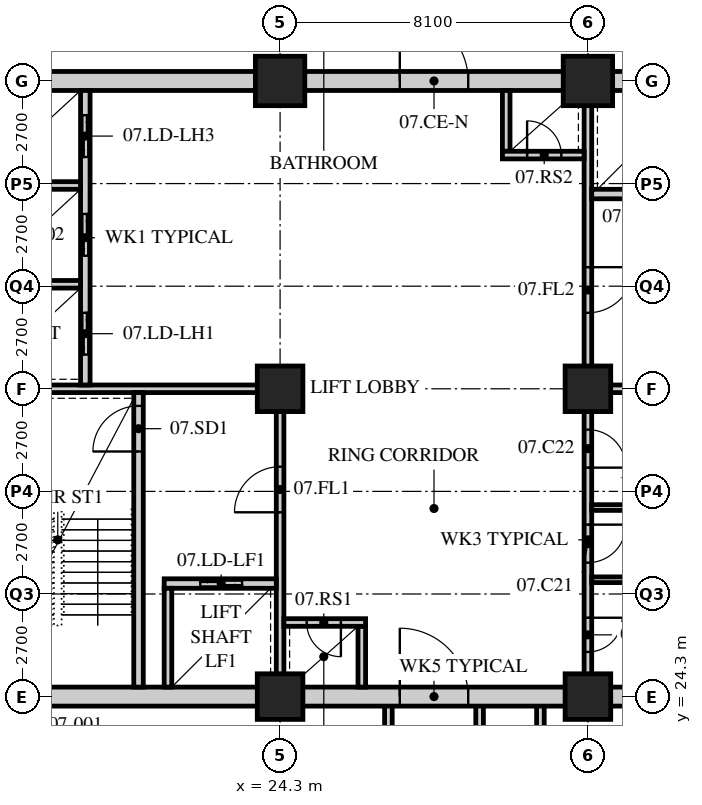
"""IFC4 building model, lengths in metres.
Left out: names, types, materials, properties, quantities, classifications, styles, units other than length and angle.
Written with IfcOpenShell. Run it as: python <this file> out.ifc"""

import sys

from ifc_helpers import new_model, si_unit, direction, frame, frame_2d, origin, origin_2d, place, context, subcontext, project, spatial, rectangle, hollow_rectangle, extrude, element, fill, save


model = new_model("IFC4")
c1 = context("Model", 3, precision=1e-05, world=origin(), true_north=direction((0.0, 1.0)))
c2 = subcontext(c1, "Body", "Model", "MODEL_VIEW")
j1 = project(units=[si_unit("LENGTHUNIT", "METRE"), si_unit("PLANEANGLEUNIT", "RADIAN")], contexts=[c1])
p1 = place(None, origin())
s1 = spatial("IfcSite", under=j1, at=p1, CompositionType="ELEMENT")
p2 = place(p1, origin())
s2 = spatial("IfcBuilding", under=s1, at=p2, CompositionType="ELEMENT")
p3 = place(p2, frame((0.0, 0.0, 36.4)))
s3 = spatial("IfcBuildingStorey", under=s2, at=p3, CompositionType="ELEMENT", Elevation=36.4)
for number, where, z_axis, x_axis in (
    (1, (24.3, 24.3, 0.0), (0.0, 0.0, 1.0), (1.0, 0.0, 0.0)),
    (2, (24.3, 32.4, 0.0), (0.0, 0.0, 1.0), (1.0, 0.0, 0.0)),
):
    element("IfcColumn", number, at=place(p3, frame(where, z_axis=z_axis, x_axis=x_axis)), inside=s3, PredefinedType="COLUMN", context=c2, shape_type="SweptSolid", body=[
        extrude(hollow_rectangle(XDim=1.2, YDim=1.2, WallThickness=0.12, at=origin_2d()), origin(), (0.0, 0.0, 1.0), 3.4),
    ])
p4 = place(p3, frame((24.3, 40.5, 0.0), z_axis=(0.0, 0.0, 1.0), x_axis=(1.0, 0.0, 0.0)))
e3 = element("IfcColumn", 3, at=p4, inside=s3, PredefinedType="COLUMN", context=c2, shape_type="SweptSolid", body=[
    extrude(hollow_rectangle(XDim=1.3, YDim=1.3, WallThickness=0.13, at=origin_2d()), origin(), (0.0, 0.0, 1.0), 3.4),
])
for number, where, z_axis, x_axis in (
    (4, (32.4, 24.3, 0.0), (0.0, 0.0, 1.0), (1.0, 0.0, 0.0)),
    (5, (32.4, 32.4, 0.0), (0.0, 0.0, 1.0), (1.0, 0.0, 0.0)),
):
    element("IfcColumn", number, at=place(p3, frame(where, z_axis=z_axis, x_axis=x_axis)), inside=s3, PredefinedType="COLUMN", context=c2, shape_type="SweptSolid", body=[
        extrude(hollow_rectangle(XDim=1.2, YDim=1.2, WallThickness=0.12, at=origin_2d()), origin(), (0.0, 0.0, 1.0), 3.4),
    ])
p5 = place(p3, frame((32.4, 40.5, 0.0), z_axis=(0.0, 0.0, 1.0), x_axis=(1.0, 0.0, 0.0)))
e6 = element("IfcColumn", 6, at=p5, inside=s3, PredefinedType="COLUMN", context=c2, shape_type="SweptSolid", body=[
    extrude(hollow_rectangle(XDim=1.3, YDim=1.3, WallThickness=0.13, at=origin_2d()), origin(), (0.0, 0.0, 1.0), 3.4),
])
for number, where, z_axis, x_axis in (
    (7, (31.15, 18.0, 0.0), (0.0, 0.0, 1.0), (0.0, 1.0, 0.0)),
    (8, (27.15, 18.0, 0.0), (0.0, 0.0, 1.0), (0.0, 1.0, 0.0)),
    (9, (29.55, 18.0, 0.0), (0.0, 0.0, 1.0), (0.0, 1.0, 0.0)),
):
    element("IfcWall", number, at=place(p3, frame(where, z_axis=z_axis, x_axis=x_axis)), inside=s3, PredefinedType="SOLIDWALL", context=c2, shape_type="SweptSolid", body=[
        extrude(rectangle(XDim=6.3, YDim=0.2, at=frame_2d((3.15, 0.0))), origin(), (0.0, 0.0, 1.0), 3.19),
    ])
p6 = place(p3, frame((15.95, 24.3, 0.0), z_axis=(0.0, 0.0, 1.0), x_axis=(1.0, 0.0, 0.0)))
e10 = element("IfcWall", 10, at=p6, inside=s3, PredefinedType="SOLIDWALL", context=c2, shape_type="SweptSolid", body=[
    extrude(rectangle(XDim=24.8, YDim=0.5, at=frame_2d((12.4, 0.0))), origin(), (0.0, 0.0, 1.0), 2.54),
])
p7 = place(p6, frame((11.5, 0.0, 0.0)))
e11 = element("IfcOpeningElement", 11, at=p7, cuts=e10, PredefinedType="OPENING", context=c2, shape_type="SweptSolid", body=[
    extrude(rectangle(XDim=1.8, YDim=2.4, at=frame_2d((0.9, 1.2))), frame((0.0, 0.26, 0.0), z_axis=(0.0, -1.0, 0.0), x_axis=(1.0, 0.0, 0.0)), (0.0, 0.0, 1.0), 0.52),
])
p8 = place(p3, frame((15.95, 40.5, 0.0), z_axis=(0.0, 0.0, 1.0), x_axis=(1.0, 0.0, 0.0)))
e12 = element("IfcWall", 12, at=p8, inside=s3, PredefinedType="SOLIDWALL", context=c2, shape_type="SweptSolid", body=[
    extrude(rectangle(XDim=24.8, YDim=0.5, at=frame_2d((12.4, 0.0))), origin(), (0.0, 0.0, 1.0), 2.54),
])
p9 = place(p8, frame((11.5, 0.0, 0.0)))
e13 = element("IfcOpeningElement", 13, at=p9, cuts=e12, PredefinedType="OPENING", context=c2, shape_type="SweptSolid", body=[
    extrude(rectangle(XDim=1.8, YDim=2.4, at=frame_2d((0.9, 1.2))), frame((0.0, 0.26, 0.0), z_axis=(0.0, -1.0, 0.0), x_axis=(1.0, 0.0, 0.0)), (0.0, 0.0, 1.0), 0.52),
])
p10 = place(p3, frame((16.45, 32.4, 0.0), z_axis=(0.0, 0.0, 1.0), x_axis=(1.0, 0.0, 0.0)))
e14 = element("IfcWall", 14, at=p10, inside=s3, PredefinedType="SOLIDWALL", context=c2, shape_type="SweptSolid", body=[
    extrude(rectangle(XDim=7.95, YDim=0.2, at=frame_2d((3.975, 0.0))), origin(), (0.0, 0.0, 1.0), 2.578),
])
p11 = place(p3, frame((24.3, 24.55, 0.0), z_axis=(0.0, 0.0, 1.0), x_axis=(0.0, 1.0, 0.0)))
e15 = element("IfcWall", 15, at=p11, inside=s3, PredefinedType="SOLIDWALL", context=c2, shape_type="SweptSolid", body=[
    extrude(rectangle(XDim=7.75, YDim=0.2, at=frame_2d((3.875, 0.0))), origin(), (0.0, 0.0, 1.0), 2.578),
])
p12 = place(p11, frame((4.6, 0.0, 0.0)))
e16 = element("IfcOpeningElement", 16, at=p12, cuts=e15, PredefinedType="OPENING", context=c2, shape_type="SweptSolid", body=[
    extrude(rectangle(XDim=1.2, YDim=2.1, at=frame_2d((0.6, 1.05))), frame((0.0, 0.11, 0.0), z_axis=(0.0, -1.0, 0.0), x_axis=(1.0, 0.0, 0.0)), (0.0, 0.0, 1.0), 0.22),
])
p13 = place(p3, frame((20.575, 24.55, 0.0), z_axis=(0.0, 0.0, 1.0), x_axis=(0.0, 1.0, 0.0)))
e17 = element("IfcWall", 17, at=p13, inside=s3, PredefinedType="SOLIDWALL", context=c2, shape_type="SweptSolid", body=[
    extrude(rectangle(XDim=7.75, YDim=0.25, at=frame_2d((3.875, 0.0))), origin(), (0.0, 0.0, 1.0), 3.19),
])
p14 = place(p13, frame((6.2, 0.0, 0.0)))
e18 = element("IfcOpeningElement", 18, at=p14, cuts=e17, PredefinedType="OPENING", context=c2, shape_type="SweptSolid", body=[
    extrude(rectangle(XDim=1.2, YDim=2.1, at=frame_2d((0.6, 1.05))), frame((0.0, 0.135, 0.0), z_axis=(0.0, -1.0, 0.0), x_axis=(1.0, 0.0, 0.0)), (0.0, 0.0, 1.0), 0.27),
])
p15 = place(p3, frame((21.25, 27.275, 0.0), z_axis=(0.0, 0.0, 1.0), x_axis=(1.0, 0.0, 0.0)))
e19 = element("IfcWall", 19, at=p15, inside=s3, PredefinedType="SOLIDWALL", context=c2, shape_type="SweptSolid", body=[
    extrude(rectangle(XDim=2.95, YDim=0.25, at=frame_2d((1.475, 0.0))), origin(), (0.0, 0.0, 1.0), 3.19),
])
p16 = place(p15, frame((0.95, 0.0, 0.0)))
e20 = element("IfcOpeningElement", 20, at=p16, cuts=e19, PredefinedType="OPENING", context=c2, shape_type="SweptSolid", body=[
    extrude(rectangle(XDim=1.1, YDim=2.4, at=frame_2d((0.55, 1.2))), frame((0.0, 0.135, 0.0), z_axis=(0.0, -1.0, 0.0), x_axis=(1.0, 0.0, 0.0)), (0.0, 0.0, 1.0), 0.27),
])
p17 = place(p3, frame((21.35, 24.55, 0.0), z_axis=(0.0, 0.0, 1.0), x_axis=(0.0, 1.0, 0.0)))
e21 = element("IfcWall", 21, at=p17, inside=s3, PredefinedType="SOLIDWALL", context=c2, shape_type="SweptSolid", body=[
    extrude(rectangle(XDim=2.6, YDim=0.2, at=frame_2d((1.3, 0.0))), origin(), (0.0, 0.0, 1.0), 3.19),
])
p18 = place(p3, frame((19.175, 32.5, 0.0), z_axis=(0.0, 0.0, 1.0), x_axis=(0.0, 1.0, 0.0)))
e22 = element("IfcWall", 22, at=p18, inside=s3, PredefinedType="SOLIDWALL", context=c2, shape_type="SweptSolid", body=[
    extrude(rectangle(XDim=7.75, YDim=0.25, at=frame_2d((3.875, 0.0))), origin(), (0.0, 0.0, 1.0), 3.19),
])
p19 = place(p18, frame((0.8, 0.0, 0.0)))
e23 = element("IfcOpeningElement", 23, at=p19, cuts=e22, PredefinedType="OPENING", context=c2, shape_type="SweptSolid", body=[
    extrude(rectangle(XDim=1.1, YDim=2.4, at=frame_2d((0.55, 1.2))), frame((0.0, 0.135, 0.0), z_axis=(0.0, -1.0, 0.0), x_axis=(1.0, 0.0, 0.0)), (0.0, 0.0, 1.0), 0.27),
])
p20 = place(p18, frame((3.4, 0.0, 0.0)))
e24 = element("IfcOpeningElement", 24, at=p20, cuts=e22, PredefinedType="OPENING", context=c2, shape_type="SweptSolid", body=[
    extrude(rectangle(XDim=1.1, YDim=2.4, at=frame_2d((0.55, 1.2))), frame((0.0, 0.135, 0.0), z_axis=(0.0, -1.0, 0.0), x_axis=(1.0, 0.0, 0.0)), (0.0, 0.0, 1.0), 0.27),
])
p21 = place(p18, frame((6.0, 0.0, 0.0)))
e25 = element("IfcOpeningElement", 25, at=p21, cuts=e22, PredefinedType="OPENING", context=c2, shape_type="SweptSolid", body=[
    extrude(rectangle(XDim=1.1, YDim=2.4, at=frame_2d((0.55, 1.2))), frame((0.0, 0.135, 0.0), z_axis=(0.0, -1.0, 0.0), x_axis=(1.0, 0.0, 0.0)), (0.0, 0.0, 1.0), 0.27),
])
for number, where, z_axis, x_axis in (
    (26, (16.45, 35.15, 0.0), (0.0, 0.0, 1.0), (1.0, 0.0, 0.0)),
    (27, (16.45, 37.75, 0.0), (0.0, 0.0, 1.0), (1.0, 0.0, 0.0)),
):
    element("IfcWall", number, at=place(p3, frame(where, z_axis=z_axis, x_axis=x_axis)), inside=s3, PredefinedType="SOLIDWALL", context=c2, shape_type="SweptSolid", body=[
        extrude(rectangle(XDim=2.6, YDim=0.2, at=frame_2d((1.3, 0.0))), origin(), (0.0, 0.0, 1.0), 3.19),
    ])
p22 = place(p3, frame((26.45, 24.55, 0.0), z_axis=(0.0, 0.0, 1.0), x_axis=(0.0, 1.0, 0.0)))
e28 = element("IfcWall", 28, at=p22, inside=s3, PredefinedType="SOLIDWALL", context=c2, shape_type="SweptSolid", body=[
    extrude(rectangle(XDim=1.6, YDim=0.2, at=frame_2d((0.8, 0.0))), origin(), (0.0, 0.0, 1.0), 3.19),
])
p23 = place(p3, frame((24.4, 26.25, 0.0), z_axis=(0.0, 0.0, 1.0), x_axis=(1.0, 0.0, 0.0)))
e29 = element("IfcWall", 29, at=p23, inside=s3, PredefinedType="SOLIDWALL", context=c2, shape_type="SweptSolid", body=[
    extrude(rectangle(XDim=2.15, YDim=0.2, at=frame_2d((1.075, 0.0))), origin(), (0.0, 0.0, 1.0), 3.19),
])
p24 = place(p23, frame((0.6, 0.0, 0.0)))
e30 = element("IfcOpeningElement", 30, at=p24, cuts=e29, PredefinedType="OPENING", context=c2, shape_type="SweptSolid", body=[
    extrude(rectangle(XDim=0.9, YDim=2.1, at=frame_2d((0.45, 1.05))), frame((0.0, 0.11, 0.0), z_axis=(0.0, -1.0, 0.0), x_axis=(1.0, 0.0, 0.0)), (0.0, 0.0, 1.0), 0.22),
])
p25 = place(p3, frame((32.3, 32.4, 0.0), z_axis=(0.0, 0.0, 1.0), x_axis=(1.0, 0.0, 0.0)))
e31 = element("IfcWall", 31, at=p25, inside=s3, PredefinedType="SOLIDWALL", context=c2, shape_type="SweptSolid", body=[
    extrude(rectangle(XDim=7.95, YDim=0.2, at=frame_2d((3.975, 0.0))), origin(), (0.0, 0.0, 1.0), 2.578),
])
p26 = place(p3, frame((32.4, 32.5, 0.0), z_axis=(0.0, 0.0, 1.0), x_axis=(0.0, 1.0, 0.0)))
e32 = element("IfcWall", 32, at=p26, inside=s3, PredefinedType="SOLIDWALL", context=c2, shape_type="SweptSolid", body=[
    extrude(rectangle(XDim=7.75, YDim=0.2, at=frame_2d((3.875, 0.0))), origin(), (0.0, 0.0, 1.0), 2.578),
])
p27 = place(p26, frame((1.9, 0.0, 0.0)))
e33 = element("IfcOpeningElement", 33, at=p27, cuts=e32, PredefinedType="OPENING", context=c2, shape_type="SweptSolid", body=[
    extrude(rectangle(XDim=1.2, YDim=2.1, at=frame_2d((0.6, 1.05))), frame((0.0, 0.11, 0.0), z_axis=(0.0, -1.0, 0.0), x_axis=(1.0, 0.0, 0.0)), (0.0, 0.0, 1.0), 0.22),
])
p28 = place(p3, frame((32.5, 37.525, 0.0), z_axis=(0.0, 0.0, 1.0), x_axis=(1.0, 0.0, 0.0)))
e34 = element("IfcWall", 34, at=p28, inside=s3, PredefinedType="SOLIDWALL", context=c2, shape_type="SweptSolid", body=[
    extrude(rectangle(XDim=2.95, YDim=0.25, at=frame_2d((1.475, 0.0))), origin(), (0.0, 0.0, 1.0), 3.19),
])
p29 = place(p28, frame((0.9, 0.0, 0.0)))
e35 = element("IfcOpeningElement", 35, at=p29, cuts=e34, PredefinedType="OPENING", context=c2, shape_type="SweptSolid", body=[
    extrude(rectangle(XDim=1.1, YDim=2.4, at=frame_2d((0.55, 1.2))), frame((0.0, 0.135, 0.0), z_axis=(0.0, -1.0, 0.0), x_axis=(1.0, 0.0, 0.0)), (0.0, 0.0, 1.0), 0.27),
])
p30 = place(p3, frame((30.25, 38.65, 0.0), z_axis=(0.0, 0.0, 1.0), x_axis=(0.0, 1.0, 0.0)))
e36 = element("IfcWall", 36, at=p30, inside=s3, PredefinedType="SOLIDWALL", context=c2, shape_type="SweptSolid", body=[
    extrude(rectangle(XDim=1.6, YDim=0.2, at=frame_2d((0.8, 0.0))), origin(), (0.0, 0.0, 1.0), 3.19),
])
p31 = place(p3, frame((30.15, 38.55, 0.0), z_axis=(0.0, 0.0, 1.0), x_axis=(1.0, 0.0, 0.0)))
e37 = element("IfcWall", 37, at=p31, inside=s3, PredefinedType="SOLIDWALL", context=c2, shape_type="SweptSolid", body=[
    extrude(rectangle(XDim=2.15, YDim=0.2, at=frame_2d((1.075, 0.0))), origin(), (0.0, 0.0, 1.0), 3.19),
])
p32 = place(p31, frame((0.65, 0.0, 0.0)))
e38 = element("IfcOpeningElement", 38, at=p32, cuts=e37, PredefinedType="OPENING", context=c2, shape_type="SweptSolid", body=[
    extrude(rectangle(XDim=0.9, YDim=2.1, at=frame_2d((0.45, 1.05))), frame((0.0, 0.11, 0.0), z_axis=(0.0, -1.0, 0.0), x_axis=(1.0, 0.0, 0.0)), (0.0, 0.0, 1.0), 0.22),
])
p33 = place(p3, frame((32.4, 24.55, 0.0), z_axis=(0.0, 0.0, 1.0), x_axis=(0.0, 1.0, 0.0)))
e39 = element("IfcWall", 39, at=p33, inside=s3, PredefinedType="PARTITIONING", context=c2, shape_type="SweptSolid", body=[
    extrude(rectangle(XDim=7.75, YDim=0.2, at=frame_2d((3.875, 0.0))), origin(), (0.0, 0.0, 1.0), 2.578),
])
p34 = place(p33, frame((0.925, 0.0, 0.0)))
e40 = element("IfcOpeningElement", 40, at=p34, cuts=e39, PredefinedType="OPENING", context=c2, shape_type="SweptSolid", body=[
    extrude(rectangle(XDim=0.9, YDim=2.1, at=frame_2d((0.45, 1.05))), frame((0.0, 0.11, 0.0), z_axis=(0.0, -1.0, 0.0), x_axis=(1.0, 0.0, 0.0)), (0.0, 0.0, 1.0), 0.22),
])
p35 = place(p33, frame((3.275, 0.0, 0.0)))
e41 = element("IfcOpeningElement", 41, at=p35, cuts=e39, PredefinedType="OPENING", context=c2, shape_type="SweptSolid", body=[
    extrude(rectangle(XDim=1.0, YDim=2.1, at=frame_2d((0.5, 1.05))), frame((0.0, 0.11, 0.0), z_axis=(0.0, -1.0, 0.0), x_axis=(1.0, 0.0, 0.0)), (0.0, 0.0, 1.0), 0.22),
])
p36 = place(p33, frame((5.775, 0.0, 0.0)))
e42 = element("IfcOpeningElement", 42, at=p36, cuts=e39, PredefinedType="OPENING", context=c2, shape_type="SweptSolid", body=[
    extrude(rectangle(XDim=1.0, YDim=2.1, at=frame_2d((0.5, 1.05))), frame((0.0, 0.11, 0.0), z_axis=(0.0, -1.0, 0.0), x_axis=(1.0, 0.0, 0.0)), (0.0, 0.0, 1.0), 0.22),
])
p37 = place(p3, frame((32.5, 27.375, 0.0), z_axis=(0.0, 0.0, 1.0), x_axis=(1.0, 0.0, 0.0)))
e43 = element("IfcWall", 43, at=p37, inside=s3, PredefinedType="PARTITIONING", context=c2, shape_type="SweptSolid", body=[
    extrude(rectangle(XDim=2.15, YDim=0.15, at=frame_2d((1.075, 0.0))), origin(), (0.0, 0.0, 1.0), 3.19),
])
p38 = place(p3, frame((32.5, 29.275, 0.0), z_axis=(0.0, 0.0, 1.0), x_axis=(1.0, 0.0, 0.0)))
e44 = element("IfcWall", 44, at=p38, inside=s3, PredefinedType="PARTITIONING", context=c2, shape_type="SweptSolid", body=[
    extrude(rectangle(XDim=4.9, YDim=0.15, at=frame_2d((2.45, 0.0))), origin(), (0.0, 0.0, 1.0), 3.19),
])
p39 = place(p34, origin())
e45 = element("IfcDoor", 45, at=p39, inside=s3, OperationType="SINGLE_SWING_LEFT", PredefinedType="DOOR", context=c2, shape_type="SweptSolid", body=[
    extrude(rectangle(XDim=0.9, YDim=2.1, at=frame_2d((0.45, 1.05))), frame((0.0, 0.025, 0.0), z_axis=(0.0, -1.0, 0.0), x_axis=(1.0, 0.0, 0.0)), (0.0, 0.0, 1.0), 0.05),
])
fill(e40, e45)
p40 = place(p35, origin())
e46 = element("IfcDoor", 46, at=p40, inside=s3, OperationType="SINGLE_SWING_LEFT", PredefinedType="DOOR", context=c2, shape_type="SweptSolid", body=[
    extrude(rectangle(XDim=1.0, YDim=2.1, at=frame_2d((0.5, 1.05))), frame((0.0, 0.025, 0.0), z_axis=(0.0, -1.0, 0.0), x_axis=(1.0, 0.0, 0.0)), (0.0, 0.0, 1.0), 0.05),
])
fill(e41, e46)
p41 = place(p36, origin())
e47 = element("IfcDoor", 47, at=p41, inside=s3, OperationType="SINGLE_SWING_RIGHT", PredefinedType="DOOR", context=c2, shape_type="SweptSolid", body=[
    extrude(rectangle(XDim=1.0, YDim=2.1, at=frame_2d((0.5, 1.05))), frame((0.0, 0.025, 0.0), z_axis=(0.0, -1.0, 0.0), x_axis=(1.0, 0.0, 0.0)), (0.0, 0.0, 1.0), 0.05),
])
fill(e42, e47)
p42 = place(p14, origin())
e48 = element("IfcDoor", 48, at=p42, inside=s3, OperationType="SINGLE_SWING_LEFT", PredefinedType="DOOR", context=c2, shape_type="SweptSolid", body=[
    extrude(rectangle(XDim=1.2, YDim=2.1, at=frame_2d((0.6, 1.05))), frame((0.0, 0.025, 0.0), z_axis=(0.0, -1.0, 0.0), x_axis=(1.0, 0.0, 0.0)), (0.0, 0.0, 1.0), 0.05),
])
fill(e18, e48)
p43 = place(p12, origin())
e49 = element("IfcDoor", 49, at=p43, inside=s3, OperationType="SINGLE_SWING_LEFT", PredefinedType="DOOR", context=c2, shape_type="SweptSolid", body=[
    extrude(rectangle(XDim=1.2, YDim=2.1, at=frame_2d((0.6, 1.05))), frame((0.0, 0.025, 0.0), z_axis=(0.0, -1.0, 0.0), x_axis=(1.0, 0.0, 0.0)), (0.0, 0.0, 1.0), 0.05),
])
fill(e16, e49)
p44 = place(p24, origin())
e50 = element("IfcDoor", 50, at=p44, inside=s3, OperationType="SINGLE_SWING_LEFT", PredefinedType="DOOR", context=c2, shape_type="SweptSolid", body=[
    extrude(rectangle(XDim=0.9, YDim=2.1, at=frame_2d((0.45, 1.05))), frame((0.0, 0.025, 0.0), z_axis=(0.0, -1.0, 0.0), x_axis=(1.0, 0.0, 0.0)), (0.0, 0.0, 1.0), 0.05),
])
fill(e30, e50)
p45 = place(p27, origin())
e51 = element("IfcDoor", 51, at=p45, inside=s3, OperationType="SINGLE_SWING_LEFT", PredefinedType="DOOR", context=c2, shape_type="SweptSolid", body=[
    extrude(rectangle(XDim=1.2, YDim=2.1, at=frame_2d((0.6, 1.05))), frame((0.0, 0.025, 0.0), z_axis=(0.0, -1.0, 0.0), x_axis=(1.0, 0.0, 0.0)), (0.0, 0.0, 1.0), 0.05),
])
fill(e33, e51)
p46 = place(p32, origin())
e52 = element("IfcDoor", 52, at=p46, inside=s3, OperationType="SINGLE_SWING_LEFT", PredefinedType="DOOR", context=c2, shape_type="SweptSolid", body=[
    extrude(rectangle(XDim=0.9, YDim=2.1, at=frame_2d((0.45, 1.05))), frame((0.0, 0.025, 0.0), z_axis=(0.0, -1.0, 0.0), x_axis=(1.0, 0.0, 0.0)), (0.0, 0.0, 1.0), 0.05),
])
fill(e38, e52)
p47 = place(p19, origin())
e53 = element("IfcDoor", 53, at=p47, inside=s3, OperationType="DOUBLE_DOOR_SLIDING", PredefinedType="DOOR", context=c2, shape_type="SweptSolid", body=[
    extrude(rectangle(XDim=1.1, YDim=2.4, at=frame_2d((0.55, 1.2))), frame((0.0, 0.025, 0.0), z_axis=(0.0, -1.0, 0.0), x_axis=(1.0, 0.0, 0.0)), (0.0, 0.0, 1.0), 0.05),
])
fill(e23, e53)
p48 = place(p20, origin())
e54 = element("IfcDoor", 54, at=p48, inside=s3, OperationType="DOUBLE_DOOR_SLIDING", PredefinedType="DOOR", context=c2, shape_type="SweptSolid", body=[
    extrude(rectangle(XDim=1.1, YDim=2.4, at=frame_2d((0.55, 1.2))), frame((0.0, 0.025, 0.0), z_axis=(0.0, -1.0, 0.0), x_axis=(1.0, 0.0, 0.0)), (0.0, 0.0, 1.0), 0.05),
])
fill(e24, e54)
p49 = place(p21, origin())
e55 = element("IfcDoor", 55, at=p49, inside=s3, OperationType="DOUBLE_DOOR_SLIDING", PredefinedType="DOOR", context=c2, shape_type="SweptSolid", body=[
    extrude(rectangle(XDim=1.1, YDim=2.4, at=frame_2d((0.55, 1.2))), frame((0.0, 0.025, 0.0), z_axis=(0.0, -1.0, 0.0), x_axis=(1.0, 0.0, 0.0)), (0.0, 0.0, 1.0), 0.05),
])
fill(e25, e55)
p50 = place(p16, origin())
e56 = element("IfcDoor", 56, at=p50, inside=s3, OperationType="DOUBLE_DOOR_SLIDING", PredefinedType="DOOR", context=c2, shape_type="SweptSolid", body=[
    extrude(rectangle(XDim=1.1, YDim=2.4, at=frame_2d((0.55, 1.2))), frame((0.0, 0.025, 0.0), z_axis=(0.0, -1.0, 0.0), x_axis=(1.0, 0.0, 0.0)), (0.0, 0.0, 1.0), 0.05),
])
fill(e20, e56)
p51 = place(p7, origin())
e57 = element("IfcDoor", 57, at=p51, inside=s3, OperationType="DOUBLE_DOOR_SINGLE_SWING", PredefinedType="DOOR", context=c2, shape_type="SweptSolid", body=[
    extrude(rectangle(XDim=1.8, YDim=2.4, at=frame_2d((0.9, 1.2))), frame((0.0, 0.025, 0.0), z_axis=(0.0, -1.0, 0.0), x_axis=(1.0, 0.0, 0.0)), (0.0, 0.0, 1.0), 0.05),
])
fill(e11, e57)
p52 = place(p9, origin())
e58 = element("IfcDoor", 58, at=p52, inside=s3, OperationType="DOUBLE_DOOR_SINGLE_SWING", PredefinedType="DOOR", context=c2, shape_type="SweptSolid", body=[
    extrude(rectangle(XDim=1.8, YDim=2.4, at=frame_2d((0.9, 1.2))), frame((0.0, 0.025, 0.0), z_axis=(0.0, -1.0, 0.0), x_axis=(1.0, 0.0, 0.0)), (0.0, 0.0, 1.0), 0.05),
])
fill(e13, e58)
save(model, sys.argv[1])
